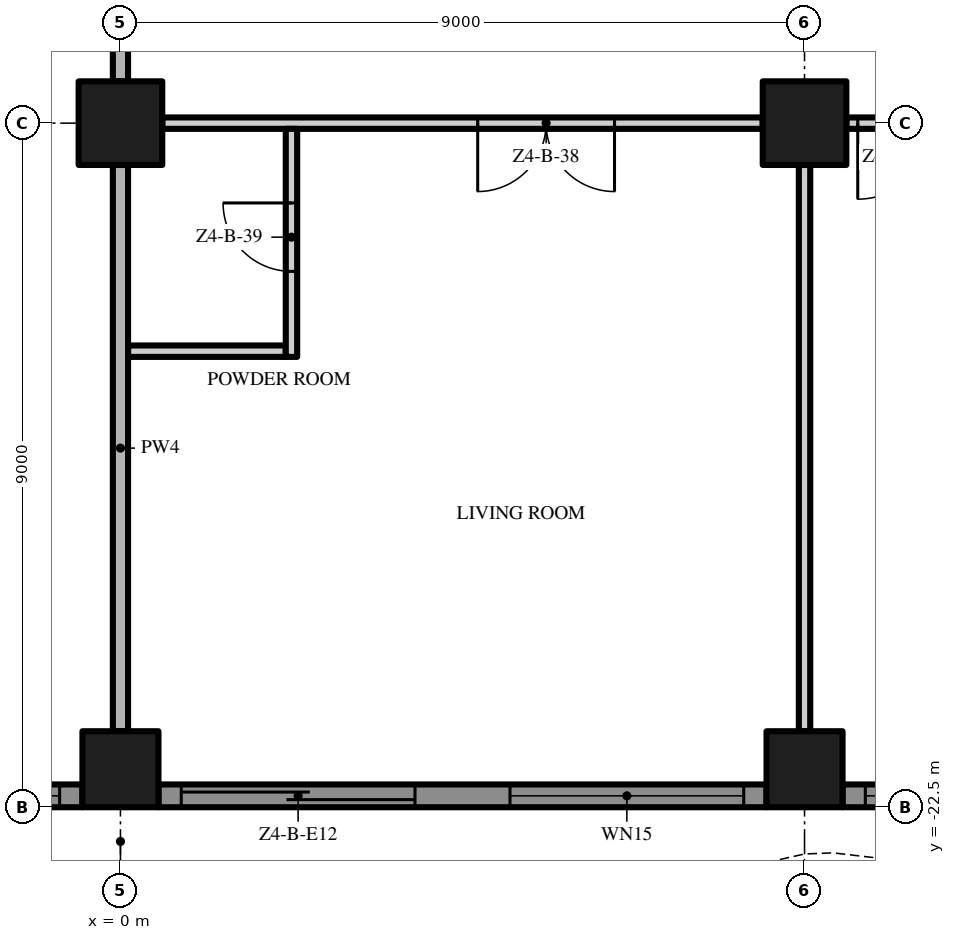
"""IFC4 building model, lengths in metres.
Left out: names, types, materials, properties, quantities, classifications, styles, units other than length and angle.
Written with IfcOpenShell. Run it as: python <this file> out.ifc"""

import sys

from ifc_helpers import new_model, si_unit, direction, frame, frame_2d, origin, origin_2d, place, context, subcontext, project, spatial, polyline, rectangle, outline, extrude, element, fill, save


model = new_model("IFC4")
c1 = context("Model", 3, precision=1e-05, world=origin(), true_north=direction((0.0, 1.0)))
c2 = subcontext(c1, "Body", "Model", "MODEL_VIEW")
j1 = project(units=[si_unit("LENGTHUNIT", "METRE"), si_unit("PLANEANGLEUNIT", "RADIAN")], contexts=[c1])
p1 = place(None, origin())
s1 = spatial("IfcSite", under=j1, at=p1, CompositionType="ELEMENT")
p2 = place(p1, origin())
s2 = spatial("IfcBuilding", under=s1, at=p2, CompositionType="ELEMENT")
p3 = place(p2, frame((0.0, 0.0, 199.6)))
s3 = spatial("IfcBuildingStorey", under=s2, at=p3, CompositionType="ELEMENT", Elevation=199.6)
p4 = place(p3, frame((0.0, -13.5, 0.0), z_axis=(0.0, 0.0, 1.0), x_axis=(1.0, 0.0, 0.0)))
e1 = element("IfcColumn", 1, at=p4, inside=s3, PredefinedType="COLUMN", context=c2, shape_type="SweptSolid", body=[
    extrude(rectangle(XDim=1.1, YDim=1.1, at=origin_2d()), origin(), (0.0, 0.0, 1.0), 3.5),
])
p5 = place(p3, frame((0.0, -22.0, 0.0), z_axis=(0.0, 0.0, 1.0), x_axis=(1.0, 0.0, 0.0)))
e2 = element("IfcColumn", 2, at=p5, inside=s3, PredefinedType="COLUMN", context=c2, shape_type="SweptSolid", body=[
    extrude(rectangle(XDim=1.0, YDim=1.0, at=origin_2d()), origin(), (0.0, 0.0, 1.0), 3.5),
])
p6 = place(p3, frame((9.0, -13.5, 0.0), z_axis=(0.0, 0.0, 1.0), x_axis=(1.0, 0.0, 0.0)))
e3 = element("IfcColumn", 3, at=p6, inside=s3, PredefinedType="COLUMN", context=c2, shape_type="SweptSolid", body=[
    extrude(rectangle(XDim=1.1, YDim=1.1, at=origin_2d()), origin(), (0.0, 0.0, 1.0), 3.5),
])
p7 = place(p3, frame((9.0, -22.0, 0.0), z_axis=(0.0, 0.0, 1.0), x_axis=(1.0, 0.0, 0.0)))
e4 = element("IfcColumn", 4, at=p7, inside=s3, PredefinedType="COLUMN", context=c2, shape_type="SweptSolid", body=[
    extrude(rectangle(XDim=1.0, YDim=1.0, at=origin_2d()), origin(), (0.0, 0.0, 1.0), 3.5),
])
p8 = place(p3, frame((-0.5, -22.35, 0.0), z_axis=(0.0, 0.0, 1.0), x_axis=(-1.0, 0.0, 0.0)))
e5 = element("IfcWall", 5, at=p8, inside=s3, PredefinedType="SOLIDWALL", context=c2, shape_type="SweptSolid", body=[
    extrude(rectangle(XDim=8.0, YDim=0.3, at=frame_2d((4.0, 0.0))), origin(), (0.0, 0.0, 1.0), 3.5),
])
p9 = place(p8, frame((4.625, 0.0, 0.45)))
e6 = element("IfcOpeningElement", 6, at=p9, cuts=e5, PredefinedType="OPENING", context=c2, shape_type="SweptSolid", body=[
    extrude(rectangle(XDim=3.075, YDim=2.65, at=frame_2d((1.538, 1.325))), frame((0.0, 0.16, 0.0), z_axis=(0.0, -1.0, 0.0), x_axis=(1.0, 0.0, 0.0)), (0.0, 0.0, 1.0), 0.32),
])
p10 = place(p8, frame((0.3, 0.0, 0.45)))
e7 = element("IfcOpeningElement", 7, at=p10, cuts=e5, PredefinedType="OPENING", context=c2, shape_type="SweptSolid", body=[
    extrude(rectangle(XDim=3.075, YDim=2.65, at=frame_2d((1.538, 1.325))), frame((0.0, 0.16, 0.0), z_axis=(0.0, -1.0, 0.0), x_axis=(1.0, 0.0, 0.0)), (0.0, 0.0, 1.0), 0.32),
])
p11 = place(p3, frame((8.5, -22.35, 0.0), z_axis=(0.0, 0.0, 1.0), x_axis=(-1.0, 0.0, 0.0)))
e8 = element("IfcWall", 8, at=p11, inside=s3, PredefinedType="SOLIDWALL", context=c2, shape_type="SweptSolid", body=[
    extrude(rectangle(XDim=8.0, YDim=0.3, at=frame_2d((4.0, 0.0))), origin(), (0.0, 0.0, 1.0), 3.5),
])
p12 = place(p11, frame((4.625, 0.0, 0.0)))
e9 = element("IfcOpeningElement", 9, at=p12, cuts=e8, PredefinedType="OPENING", context=c2, shape_type="SweptSolid", body=[
    extrude(rectangle(XDim=3.075, YDim=2.4, at=frame_2d((1.538, 1.2))), frame((0.0, 0.16, 0.0), z_axis=(0.0, -1.0, 0.0), x_axis=(1.0, 0.0, 0.0)), (0.0, 0.0, 1.0), 0.32),
])
p13 = place(p11, frame((0.3, 0.0, 0.45)))
e10 = element("IfcOpeningElement", 10, at=p13, cuts=e8, PredefinedType="OPENING", context=c2, shape_type="SweptSolid", body=[
    extrude(rectangle(XDim=3.075, YDim=2.65, at=frame_2d((1.538, 1.325))), frame((0.0, 0.16, 0.0), z_axis=(0.0, -1.0, 0.0), x_axis=(1.0, 0.0, 0.0)), (0.0, 0.0, 1.0), 0.32),
])
p14 = place(p3, frame((17.5, -22.35, 0.0), z_axis=(0.0, 0.0, 1.0), x_axis=(-1.0, 0.0, 0.0)))
e11 = element("IfcWall", 11, at=p14, inside=s3, PredefinedType="SOLIDWALL", context=c2, shape_type="SweptSolid", body=[
    extrude(rectangle(XDim=8.0, YDim=0.3, at=frame_2d((4.0, 0.0))), origin(), (0.0, 0.0, 1.0), 3.5),
])
p15 = place(p14, frame((4.625, 0.0, 0.45)))
e12 = element("IfcOpeningElement", 12, at=p15, cuts=e11, PredefinedType="OPENING", context=c2, shape_type="SweptSolid", body=[
    extrude(rectangle(XDim=3.075, YDim=2.65, at=frame_2d((1.538, 1.325))), frame((0.0, 0.16, 0.0), z_axis=(0.0, -1.0, 0.0), x_axis=(1.0, 0.0, 0.0)), (0.0, 0.0, 1.0), 0.32),
])
p16 = place(p14, frame((0.3, 0.0, 0.0)))
e13 = element("IfcOpeningElement", 13, at=p16, cuts=e11, PredefinedType="OPENING", context=c2, shape_type="SweptSolid", body=[
    extrude(rectangle(XDim=3.075, YDim=2.4, at=frame_2d((1.538, 1.2))), frame((0.0, 0.16, 0.0), z_axis=(0.0, -1.0, 0.0), x_axis=(1.0, 0.0, 0.0)), (0.0, 0.0, 1.0), 0.32),
])
p17 = place(p3, origin())
e14 = element("IfcWall", 14, at=p17, inside=s3, PredefinedType="USERDEFINED", context=c2, shape_type="SweptSolid", body=[
    extrude(outline(polyline([(-22.5, -23.451), (-21.0, -23.115), (-20.625, -23.1), (-19.5, -23.231), (-18.0, -23.755), (-16.5, -24.488), (-15.0, -25.149), (-13.5, -25.485), (-13.125, -25.5), (-12.0, -25.369), (-10.5, -24.845), (-9.0, -24.112), (-7.5, -23.451), (-6.0, -23.115), (-5.625, -23.1), (-4.5, -23.231), (-3.0, -23.755), (-1.5, -24.488), (0.0, -25.149), (1.5, -25.485), (1.875, -25.5), (3.0, -25.369), (4.5, -24.845), (6.0, -24.112), (7.5, -23.451), (9.0, -23.115), (9.375, -23.1), (10.5, -23.231), (12.0, -23.755), (13.5, -24.488), (15.0, -25.149), (16.5, -25.485), (16.875, -25.5), (18.0, -25.369), (19.5, -24.845), (21.0, -24.112), (22.5, -23.451), (22.399, -23.223), (20.895, -23.885), (19.404, -24.614), (17.944, -25.124), (16.865, -25.249), (16.533, -25.236), (15.079, -24.91), (13.605, -24.261), (12.096, -23.524), (10.556, -22.986), (9.385, -22.849), (8.967, -22.866), (7.421, -23.213), (5.895, -23.885), (4.404, -24.614), (2.944, -25.124), (1.865, -25.249), (1.533, -25.236), (0.079, -24.91), (-1.395, -24.261), (-2.904, -23.524), (-4.444, -22.986), (-5.615, -22.849), (-6.033, -22.866), (-7.579, -23.213), (-9.105, -23.885), (-10.596, -24.614), (-12.056, -25.124), (-13.135, -25.249), (-13.467, -25.236), (-14.921, -24.91), (-16.395, -24.261), (-17.904, -23.524), (-19.444, -22.986), (-20.615, -22.849), (-21.033, -22.866), (-22.555, -23.208), (-22.5, -23.451)])), origin(), (0.0, 0.0, 1.0), 0.9),
])
p18 = place(p3, frame((0.1, -16.5, 0.0), z_axis=(0.0, 0.0, 1.0), x_axis=(1.0, 0.0, 0.0)))
e15 = element("IfcWall", 15, at=p18, inside=s3, PredefinedType="PARTITIONING", context=c2, shape_type="SweptSolid", body=[
    extrude(rectangle(XDim=2.075, YDim=0.15, at=frame_2d((1.038, 0.0))), origin(), (0.0, 0.0, 1.0), 3.5),
])
p19 = place(p3, frame((8.45, -13.5, 0.0), z_axis=(0.0, 0.0, 1.0), x_axis=(-1.0, 0.0, 0.0)))
e16 = element("IfcWall", 16, at=p19, inside=s3, PredefinedType="PARTITIONING", context=c2, shape_type="SweptSolid", body=[
    extrude(rectangle(XDim=7.9, YDim=0.15, at=frame_2d((3.95, 0.0))), origin(), (0.0, 0.0, 1.0), 3.5),
])
p20 = place(p19, frame((1.95, 0.0, 0.0)))
e17 = element("IfcOpeningElement", 17, at=p20, cuts=e16, PredefinedType="OPENING", context=c2, shape_type="SweptSolid", body=[
    extrude(rectangle(XDim=1.8, YDim=2.4, at=frame_2d((0.9, 1.2))), frame((0.0, 0.085, 0.0), z_axis=(0.0, -1.0, 0.0), x_axis=(1.0, 0.0, 0.0)), (0.0, 0.0, 1.0), 0.17),
])
p21 = place(p3, frame((17.45, -13.5, 0.0), z_axis=(0.0, 0.0, 1.0), x_axis=(-1.0, 0.0, 0.0)))
e18 = element("IfcWall", 18, at=p21, inside=s3, PredefinedType="PARTITIONING", context=c2, shape_type="SweptSolid", body=[
    extrude(rectangle(XDim=7.9, YDim=0.15, at=frame_2d((3.95, 0.0))), origin(), (0.0, 0.0, 1.0), 3.5),
])
p22 = place(p21, frame((6.75, 0.0, 0.0)))
e19 = element("IfcOpeningElement", 19, at=p22, cuts=e18, PredefinedType="OPENING", context=c2, shape_type="SweptSolid", body=[
    extrude(rectangle(XDim=1.0, YDim=2.4, at=frame_2d((0.5, 1.2))), frame((0.0, 0.085, 0.0), z_axis=(0.0, -1.0, 0.0), x_axis=(1.0, 0.0, 0.0)), (0.0, 0.0, 1.0), 0.17),
])
p23 = place(p21, frame((0.15, 0.0, 0.0)))
e20 = element("IfcOpeningElement", 20, at=p23, cuts=e18, PredefinedType="OPENING", context=c2, shape_type="SweptSolid", body=[
    extrude(rectangle(XDim=1.0, YDim=2.4, at=frame_2d((0.5, 1.2))), frame((0.0, 0.085, 0.0), z_axis=(0.0, -1.0, 0.0), x_axis=(1.0, 0.0, 0.0)), (0.0, 0.0, 1.0), 0.17),
])
p24 = place(p3, frame((0.0, -21.5, 0.0), z_axis=(0.0, 0.0, 1.0), x_axis=(0.0, 1.0, 0.0)))
e21 = element("IfcWall", 21, at=p24, inside=s3, PredefinedType="PARTITIONING", context=c2, shape_type="SweptSolid", body=[
    extrude(rectangle(XDim=7.45, YDim=0.2, at=frame_2d((3.725, 0.0))), origin(), (0.0, 0.0, 1.0), 3.5),
])
p25 = place(p3, frame((0.0, -12.95, 0.0), z_axis=(0.0, 0.0, 1.0), x_axis=(0.0, 1.0, 0.0)))
e22 = element("IfcWall", 22, at=p25, inside=s3, PredefinedType="PARTITIONING", context=c2, shape_type="SweptSolid", body=[
    extrude(rectangle(XDim=7.9, YDim=0.2, at=frame_2d((3.95, 0.0))), origin(), (0.0, 0.0, 1.0), 3.5),
])
p26 = place(p3, frame((2.25, -16.575, 0.0), z_axis=(0.0, 0.0, 1.0), x_axis=(0.0, 1.0, 0.0)))
e23 = element("IfcWall", 23, at=p26, inside=s3, PredefinedType="PARTITIONING", context=c2, shape_type="SweptSolid", body=[
    extrude(rectangle(XDim=3.0, YDim=0.15, at=frame_2d((1.5, 0.0))), origin(), (0.0, 0.0, 1.0), 3.5),
])
p27 = place(p26, frame((1.125, 0.0, 0.0)))
e24 = element("IfcOpeningElement", 24, at=p27, cuts=e23, PredefinedType="OPENING", context=c2, shape_type="SweptSolid", body=[
    extrude(rectangle(XDim=0.9, YDim=2.1, at=frame_2d((0.45, 1.05))), frame((0.0, 0.085, 0.0), z_axis=(0.0, -1.0, 0.0), x_axis=(1.0, 0.0, 0.0)), (0.0, 0.0, 1.0), 0.17),
])
p28 = place(p3, frame((9.0, -21.5, 0.0), z_axis=(0.0, 0.0, 1.0), x_axis=(0.0, 1.0, 0.0)))
e25 = element("IfcWall", 25, at=p28, inside=s3, PredefinedType="PARTITIONING", context=c2, shape_type="SweptSolid", body=[
    extrude(rectangle(XDim=7.45, YDim=0.15, at=frame_2d((3.725, 0.0))), origin(), (0.0, 0.0, 1.0), 3.5),
])
p29 = place(p10, origin())
e26 = element("IfcWindow", 26, at=p29, inside=s3, PartitioningType="SINGLE_PANEL", PredefinedType="WINDOW", context=c2, shape_type="SweptSolid", body=[
    extrude(rectangle(XDim=3.075, YDim=2.65, at=frame_2d((1.538, 1.325))), frame((0.0, 0.03, 0.0), z_axis=(0.0, -1.0, 0.0), x_axis=(1.0, 0.0, 0.0)), (0.0, 0.0, 1.0), 0.06),
])
fill(e7, e26)
p30 = place(p12, origin())
e27 = element("IfcDoor", 27, at=p30, inside=s3, OperationType="SINGLE_SWING_LEFT", PredefinedType="DOOR", context=c2, shape_type="SweptSolid", body=[
    extrude(rectangle(XDim=3.075, YDim=2.4, at=frame_2d((1.538, 1.2))), frame((0.0, 0.025, 0.0), z_axis=(0.0, -1.0, 0.0), x_axis=(1.0, 0.0, 0.0)), (0.0, 0.0, 1.0), 0.05),
])
fill(e9, e27)
p31 = place(p13, origin())
e28 = element("IfcWindow", 28, at=p31, inside=s3, PartitioningType="SINGLE_PANEL", PredefinedType="WINDOW", context=c2, shape_type="SweptSolid", body=[
    extrude(rectangle(XDim=3.075, YDim=2.65, at=frame_2d((1.538, 1.325))), frame((0.0, 0.03, 0.0), z_axis=(0.0, -1.0, 0.0), x_axis=(1.0, 0.0, 0.0)), (0.0, 0.0, 1.0), 0.06),
])
fill(e10, e28)
p32 = place(p15, origin())
e29 = element("IfcWindow", 29, at=p32, inside=s3, PartitioningType="SINGLE_PANEL", PredefinedType="WINDOW", context=c2, shape_type="SweptSolid", body=[
    extrude(rectangle(XDim=3.075, YDim=2.65, at=frame_2d((1.538, 1.325))), frame((0.0, 0.03, 0.0), z_axis=(0.0, -1.0, 0.0), x_axis=(1.0, 0.0, 0.0)), (0.0, 0.0, 1.0), 0.06),
])
fill(e12, e29)
p33 = place(p20, origin())
e30 = element("IfcDoor", 30, at=p33, inside=s3, OperationType="DOUBLE_DOOR_SINGLE_SWING", PredefinedType="DOOR", context=c2, shape_type="SweptSolid", body=[
    extrude(rectangle(XDim=1.8, YDim=2.4, at=frame_2d((0.9, 1.2))), frame((0.0, 0.025, 0.0), z_axis=(0.0, -1.0, 0.0), x_axis=(1.0, 0.0, 0.0)), (0.0, 0.0, 1.0), 0.05),
])
fill(e17, e30)
p34 = place(p27, origin())
e31 = element("IfcDoor", 31, at=p34, inside=s3, OperationType="SINGLE_SWING_RIGHT", PredefinedType="DOOR", context=c2, shape_type="SweptSolid", body=[
    extrude(rectangle(XDim=0.9, YDim=2.1, at=frame_2d((0.45, 1.05))), frame((0.0, 0.025, 0.0), z_axis=(0.0, -1.0, 0.0), x_axis=(1.0, 0.0, 0.0)), (0.0, 0.0, 1.0), 0.05),
])
fill(e24, e31)
p35 = place(p22, origin())
e32 = element("IfcDoor", 32, at=p35, inside=s3, OperationType="SINGLE_SWING_RIGHT", PredefinedType="DOOR", context=c2, shape_type="SweptSolid", body=[
    extrude(rectangle(XDim=1.0, YDim=2.4, at=frame_2d((0.5, 1.2))), frame((0.0, 0.025, 0.0), z_axis=(0.0, -1.0, 0.0), x_axis=(1.0, 0.0, 0.0)), (0.0, 0.0, 1.0), 0.05),
])
fill(e19, e32)
save(model, sys.argv[1])
